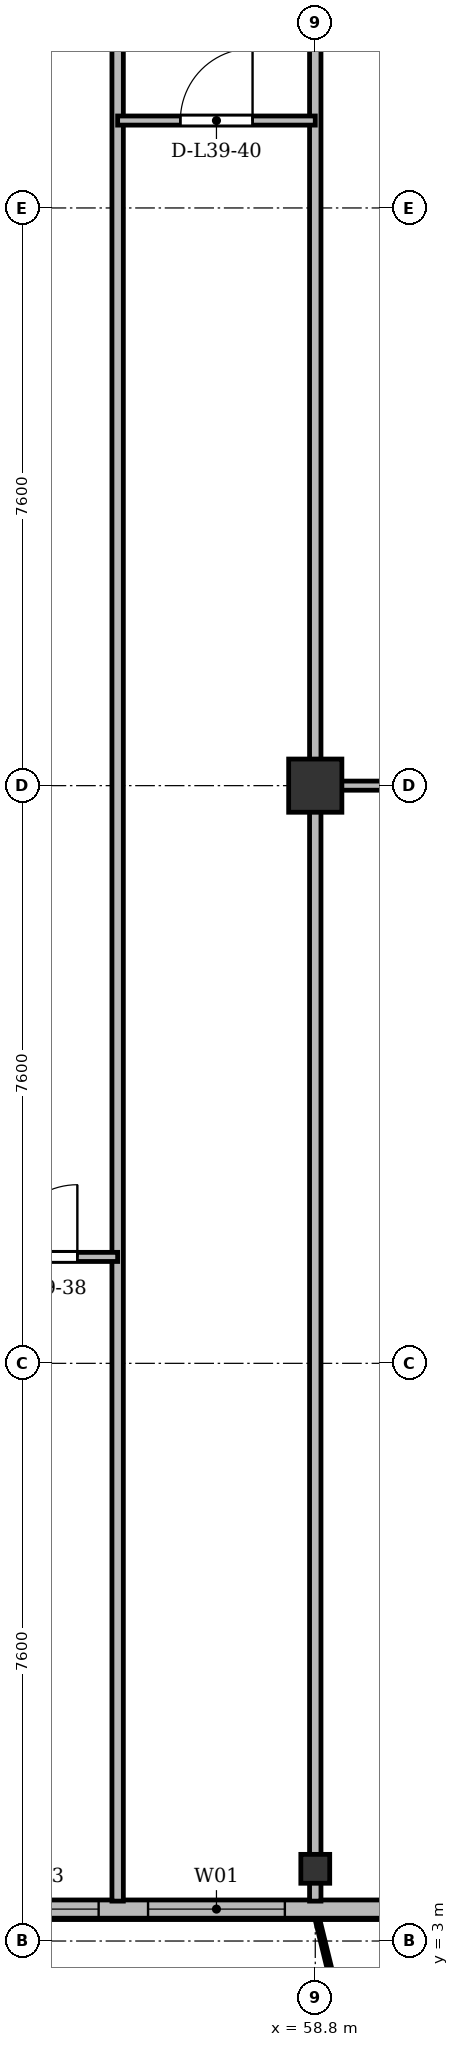
"""IFC4 building model, lengths in metres.
Left out: names, types, materials, properties, quantities, classifications, styles, units other than length and angle.
Written with IfcOpenShell. Run it as: python <this file> out.ifc"""

import sys

from ifc_helpers import new_model, si_unit, direction, frame, frame_2d, origin, origin_2d, place, context, subcontext, project, spatial, rectangle, i_section, extrude, source, transform, mapped, element, fill, save


model = new_model("IFC4")
c1 = context("Model", 3, precision=1e-05, world=origin(), true_north=direction((0.0, 1.0)))
c2 = subcontext(c1, "Body", "Model", "MODEL_VIEW")
j1 = project(units=[si_unit("LENGTHUNIT", "METRE"), si_unit("PLANEANGLEUNIT", "RADIAN")], contexts=[c1])
p1 = place(None, origin())
s1 = spatial("IfcSite", under=j1, at=p1, CompositionType="ELEMENT")
p2 = place(p1, origin())
s2 = spatial("IfcBuilding", under=s1, at=p2, CompositionType="ELEMENT")
p3 = place(p2, frame((0.0, 0.0, 150.1)))
s3 = spatial("IfcBuildingStorey", under=s2, at=p3, CompositionType="ELEMENT", Elevation=150.1)
m1 = source(origin(), c2, "Body", "SweptSolid", [
    extrude(i_section(OverallWidth=0.38, OverallDepth=0.38, WebThickness=0.02, FlangeThickness=0.03, at=origin_2d()), origin(), (0.0, 0.0, 1.0), 3.6),
])
p4 = place(p3, frame((58.8, 3.95, 0.0), z_axis=(0.0, 0.0, 1.0), x_axis=(1.0, 0.0, 0.0)))
e1 = element("IfcColumn", 1, at=p4, inside=s3, PredefinedType="COLUMN", context=c2, shape_type="MappedRepresentation", body=[
    mapped(m1, transform((0.0, 0.0, 0.0), x_axis=(1.0, 0.0, 0.0), y_axis=(0.0, 1.0, 0.0), z_axis=(0.0, 0.0, 1.0), scale=1.0)),
])
m2 = source(origin(), c2, "Body", "SweptSolid", [
    extrude(rectangle(XDim=0.7, YDim=0.7, at=origin_2d()), origin(), (0.0, 0.0, 1.0), 3.6),
])
p5 = place(p3, frame((58.8, 18.2, 0.0), z_axis=(0.0, 0.0, 1.0), x_axis=(1.0, 0.0, 0.0)))
e2 = element("IfcColumn", 2, at=p5, inside=s3, PredefinedType="COLUMN", context=c2, shape_type="MappedRepresentation", body=[
    mapped(m2, transform((0.0, 0.0, 0.0), x_axis=(1.0, 0.0, 0.0), y_axis=(0.0, 1.0, 0.0), z_axis=(0.0, 0.0, 1.0), scale=1.0)),
])
p6 = place(p3, frame((63.6, 3.42, 0.0), z_axis=(0.0, 0.0, 1.0), x_axis=(-1.0, 0.0, 0.0)))
e3 = element("IfcWall", 3, at=p6, inside=s3, PredefinedType="SOLIDWALL", context=c2, shape_type="SweptSolid", body=[
    extrude(rectangle(XDim=52.8, YDim=0.24, at=frame_2d((26.4, 0.0))), origin(), (0.0, 0.0, 1.0), 3.35),
])
p7 = place(p6, frame((1.62, 0.0, 0.9)))
e4 = element("IfcOpeningElement", 4, at=p7, cuts=e3, PredefinedType="OPENING", context=c2, shape_type="SweptSolid", body=[
    extrude(rectangle(XDim=1.65, YDim=1.85, at=frame_2d((0.825, 0.925))), frame((0.0, 0.13, 0.0), z_axis=(0.0, -1.0, 0.0), x_axis=(1.0, 0.0, 0.0)), (0.0, 0.0, 1.0), 0.26),
])
p8 = place(p6, frame((5.2, 0.0, 0.9)))
e5 = element("IfcOpeningElement", 5, at=p8, cuts=e3, PredefinedType="OPENING", context=c2, shape_type="SweptSolid", body=[
    extrude(rectangle(XDim=1.8, YDim=1.8, at=frame_2d((0.9, 0.9))), frame((0.0, 0.13, 0.0), z_axis=(0.0, -1.0, 0.0), x_axis=(1.0, 0.0, 0.0)), (0.0, 0.0, 1.0), 0.26),
])
p9 = place(p6, frame((7.65, 0.0, 0.9)))
e6 = element("IfcOpeningElement", 6, at=p9, cuts=e3, PredefinedType="OPENING", context=c2, shape_type="SweptSolid", body=[
    extrude(rectangle(XDim=1.5, YDim=1.75, at=frame_2d((0.75, 0.875))), frame((0.0, 0.13, 0.0), z_axis=(0.0, -1.0, 0.0), x_axis=(1.0, 0.0, 0.0)), (0.0, 0.0, 1.0), 0.26),
])
p10 = place(p6, frame((10.25, 0.0, 0.9)))
e7 = element("IfcOpeningElement", 7, at=p10, cuts=e3, PredefinedType="OPENING", context=c2, shape_type="SweptSolid", body=[
    extrude(rectangle(XDim=1.5, YDim=1.75, at=frame_2d((0.75, 0.875))), frame((0.0, 0.13, 0.0), z_axis=(0.0, -1.0, 0.0), x_axis=(1.0, 0.0, 0.0)), (0.0, 0.0, 1.0), 0.26),
])
p11 = place(p6, frame((14.417, 0.0, 0.0)))
e8 = element("IfcOpeningElement", 8, at=p11, cuts=e3, PredefinedType="OPENING", context=c2, shape_type="SweptSolid", body=[
    extrude(rectangle(XDim=1.2, YDim=2.2, at=frame_2d((0.6, 1.1))), frame((0.0, 0.13, 0.0), z_axis=(0.0, -1.0, 0.0), x_axis=(1.0, 0.0, 0.0)), (0.0, 0.0, 1.0), 0.26),
])
p12 = place(p6, frame((25.575, 0.0, 0.9)))
e9 = element("IfcOpeningElement", 9, at=p12, cuts=e3, PredefinedType="OPENING", context=c2, shape_type="SweptSolid", body=[
    extrude(rectangle(XDim=1.65, YDim=1.85, at=frame_2d((0.825, 0.925))), frame((0.0, 0.13, 0.0), z_axis=(0.0, -1.0, 0.0), x_axis=(1.0, 0.0, 0.0)), (0.0, 0.0, 1.0), 0.26),
])
p13 = place(p6, frame((35.7, 0.0, 0.9)))
e10 = element("IfcOpeningElement", 10, at=p13, cuts=e3, PredefinedType="OPENING", context=c2, shape_type="SweptSolid", body=[
    extrude(rectangle(XDim=1.8, YDim=1.8, at=frame_2d((0.9, 0.9))), frame((0.0, 0.13, 0.0), z_axis=(0.0, -1.0, 0.0), x_axis=(1.0, 0.0, 0.0)), (0.0, 0.0, 1.0), 0.26),
])
p14 = place(p6, frame((41.656, 0.0, 0.0)))
e11 = element("IfcOpeningElement", 11, at=p14, cuts=e3, PredefinedType="OPENING", context=c2, shape_type="SweptSolid", body=[
    extrude(rectangle(XDim=1.2, YDim=2.2, at=frame_2d((0.6, 1.1))), frame((0.0, 0.13, 0.0), z_axis=(0.0, -1.0, 0.0), x_axis=(1.0, 0.0, 0.0)), (0.0, 0.0, 1.0), 0.26),
])
p15 = place(p6, frame((43.65, 0.0, 0.9)))
e12 = element("IfcOpeningElement", 12, at=p15, cuts=e3, PredefinedType="OPENING", context=c2, shape_type="SweptSolid", body=[
    extrude(rectangle(XDim=1.5, YDim=1.75, at=frame_2d((0.75, 0.875))), frame((0.0, 0.13, 0.0), z_axis=(0.0, -1.0, 0.0), x_axis=(1.0, 0.0, 0.0)), (0.0, 0.0, 1.0), 0.26),
])
p16 = place(p6, frame((45.7, 0.0, 0.9)))
e13 = element("IfcOpeningElement", 13, at=p16, cuts=e3, PredefinedType="OPENING", context=c2, shape_type="SweptSolid", body=[
    extrude(rectangle(XDim=2.0, YDim=1.95, at=frame_2d((1.0, 0.975))), frame((0.0, 0.13, 0.0), z_axis=(0.0, -1.0, 0.0), x_axis=(1.0, 0.0, 0.0)), (0.0, 0.0, 1.0), 0.26),
])
p17 = place(p6, frame((49.53, 0.0, 0.9)))
e14 = element("IfcOpeningElement", 14, at=p17, cuts=e3, PredefinedType="OPENING", context=c2, shape_type="SweptSolid", body=[
    extrude(rectangle(XDim=1.65, YDim=1.85, at=frame_2d((0.825, 0.925))), frame((0.0, 0.13, 0.0), z_axis=(0.0, -1.0, 0.0), x_axis=(1.0, 0.0, 0.0)), (0.0, 0.0, 1.0), 0.26),
])
p18 = place(p3, frame((58.8, 3.525, 0.0), z_axis=(0.0, 0.0, 1.0), x_axis=(0.0, 1.0, 0.0)))
e15 = element("IfcWall", 15, at=p18, inside=s3, PredefinedType="PARTITIONING", context=c2, shape_type="SweptSolid", body=[
    extrude(rectangle(XDim=27.275, YDim=0.15, at=frame_2d((13.638, 0.0))), origin(), (0.0, 0.0, 1.0), 2.85),
])
p19 = place(p3, frame((56.2, 3.525, 0.0), z_axis=(0.0, 0.0, 1.0), x_axis=(0.0, 1.0, 0.0)))
e16 = element("IfcWall", 16, at=p19, inside=s3, PredefinedType="PARTITIONING", context=c2, shape_type="SweptSolid", body=[
    extrude(rectangle(XDim=27.275, YDim=0.15, at=frame_2d((13.638, 0.0))), origin(), (0.0, 0.0, 1.0), 2.75),
])
p20 = place(p3, frame((54.2, 12.0, 0.0), z_axis=(0.0, 0.0, 1.0), x_axis=(1.0, 0.0, 0.0)))
e17 = element("IfcWall", 17, at=p20, inside=s3, PredefinedType="PARTITIONING", context=c2, shape_type="SweptSolid", body=[
    extrude(rectangle(XDim=2.0, YDim=0.12, at=frame_2d((1.0, 0.0))), origin(), (0.0, 0.0, 1.0), 3.35),
])
p21 = place(p20, frame((0.52, 0.0, 0.0)))
e18 = element("IfcOpeningElement", 18, at=p21, cuts=e17, PredefinedType="OPENING", context=c2, shape_type="SweptSolid", body=[
    extrude(rectangle(XDim=0.95, YDim=2.15, at=frame_2d((0.475, 1.075))), frame((0.0, 0.07, 0.0), z_axis=(0.0, -1.0, 0.0), x_axis=(1.0, 0.0, 0.0)), (0.0, 0.0, 1.0), 0.14),
])
p22 = place(p3, frame((56.2, 26.95, 0.0), z_axis=(0.0, 0.0, 1.0), x_axis=(1.0, 0.0, 0.0)))
e19 = element("IfcWall", 19, at=p22, inside=s3, PredefinedType="PARTITIONING", context=c2, shape_type="SweptSolid", body=[
    extrude(rectangle(XDim=2.6, YDim=0.12, at=frame_2d((1.3, 0.0))), origin(), (0.0, 0.0, 1.0), 2.85),
])
p23 = place(p22, frame((0.825, 0.0, 0.0)))
e20 = element("IfcOpeningElement", 20, at=p23, cuts=e19, PredefinedType="OPENING", context=c2, shape_type="SweptSolid", body=[
    extrude(rectangle(XDim=0.95, YDim=2.15, at=frame_2d((0.475, 1.075))), frame((0.0, 0.07, 0.0), z_axis=(0.0, -1.0, 0.0), x_axis=(1.0, 0.0, 0.0)), (0.0, 0.0, 1.0), 0.14),
])
p24 = place(p3, frame((58.8, 18.2, 0.0), z_axis=(0.0, 0.0, 1.0), x_axis=(1.0, 0.0, 0.0)))
e21 = element("IfcWall", 21, at=p24, inside=s3, PredefinedType="PARTITIONING", context=c2, shape_type="SweptSolid", body=[
    extrude(rectangle(XDim=7.575, YDim=0.12, at=frame_2d((3.788, 0.0))), origin(), (0.0, 0.0, 1.0), 2.75),
])
p25 = place(p24, frame((3.313, 0.0, 0.0)))
e22 = element("IfcOpeningElement", 22, at=p25, cuts=e21, PredefinedType="OPENING", context=c2, shape_type="SweptSolid", body=[
    extrude(rectangle(XDim=0.95, YDim=2.15, at=frame_2d((0.475, 1.075))), frame((0.0, 0.07, 0.0), z_axis=(0.0, -1.0, 0.0), x_axis=(1.0, 0.0, 0.0)), (0.0, 0.0, 1.0), 0.14),
])
m3 = source(origin(), c2, "Body", "SweptSolid", [
    extrude(rectangle(XDim=1.8, YDim=1.8, at=frame_2d((0.9, 0.9))), frame((0.0, 0.03, 0.0), z_axis=(0.0, -1.0, 0.0), x_axis=(1.0, 0.0, 0.0)), (0.0, 0.0, 1.0), 0.06),
])
p26 = place(p8, origin())
e23 = element("IfcWindow", 23, at=p26, inside=s3, PartitioningType="SINGLE_PANEL", PredefinedType="WINDOW", context=c2, shape_type="MappedRepresentation", body=[
    mapped(m3, transform((0.0, 0.0, 0.0), x_axis=(1.0, 0.0, 0.0), y_axis=(0.0, 1.0, 0.0), z_axis=(0.0, 0.0, 1.0), scale=1.0)),
])
fill(e5, e23)
m4 = source(origin(), c2, "Body", "SweptSolid", [
    extrude(rectangle(XDim=1.5, YDim=1.75, at=frame_2d((0.75, 0.875))), frame((0.0, 0.03, 0.0), z_axis=(0.0, -1.0, 0.0), x_axis=(1.0, 0.0, 0.0)), (0.0, 0.0, 1.0), 0.06),
])
p27 = place(p9, origin())
e24 = element("IfcWindow", 24, at=p27, inside=s3, PartitioningType="SINGLE_PANEL", PredefinedType="WINDOW", context=c2, shape_type="MappedRepresentation", body=[
    mapped(m4, transform((0.0, 0.0, 0.0), x_axis=(1.0, 0.0, 0.0), y_axis=(0.0, 1.0, 0.0), z_axis=(0.0, 0.0, 1.0), scale=1.0)),
])
fill(e6, e24)
m5 = source(origin(), c2, "Body", "SweptSolid", [
    extrude(rectangle(XDim=0.95, YDim=2.15, at=frame_2d((0.475, 1.075))), frame((0.0, 0.025, 0.0), z_axis=(0.0, -1.0, 0.0), x_axis=(1.0, 0.0, 0.0)), (0.0, 0.0, 1.0), 0.05),
])
p28 = place(p21, origin())
e25 = element("IfcDoor", 25, at=p28, inside=s3, OperationType="SINGLE_SWING_RIGHT", PredefinedType="DOOR", context=c2, shape_type="MappedRepresentation", body=[
    mapped(m5, transform((0.0, 0.0, 0.0), x_axis=(1.0, 0.0, 0.0), y_axis=(0.0, 1.0, 0.0), z_axis=(0.0, 0.0, 1.0), scale=1.0)),
])
fill(e18, e25)
p29 = place(p23, origin())
e26 = element("IfcDoor", 26, at=p29, inside=s3, OperationType="SINGLE_SWING_RIGHT", PredefinedType="DOOR", context=c2, shape_type="MappedRepresentation", body=[
    mapped(m5, transform((0.0, 0.0, 0.0), x_axis=(1.0, 0.0, 0.0), y_axis=(0.0, 1.0, 0.0), z_axis=(0.0, 0.0, 1.0), scale=1.0)),
])
fill(e20, e26)
save(model, sys.argv[1])
